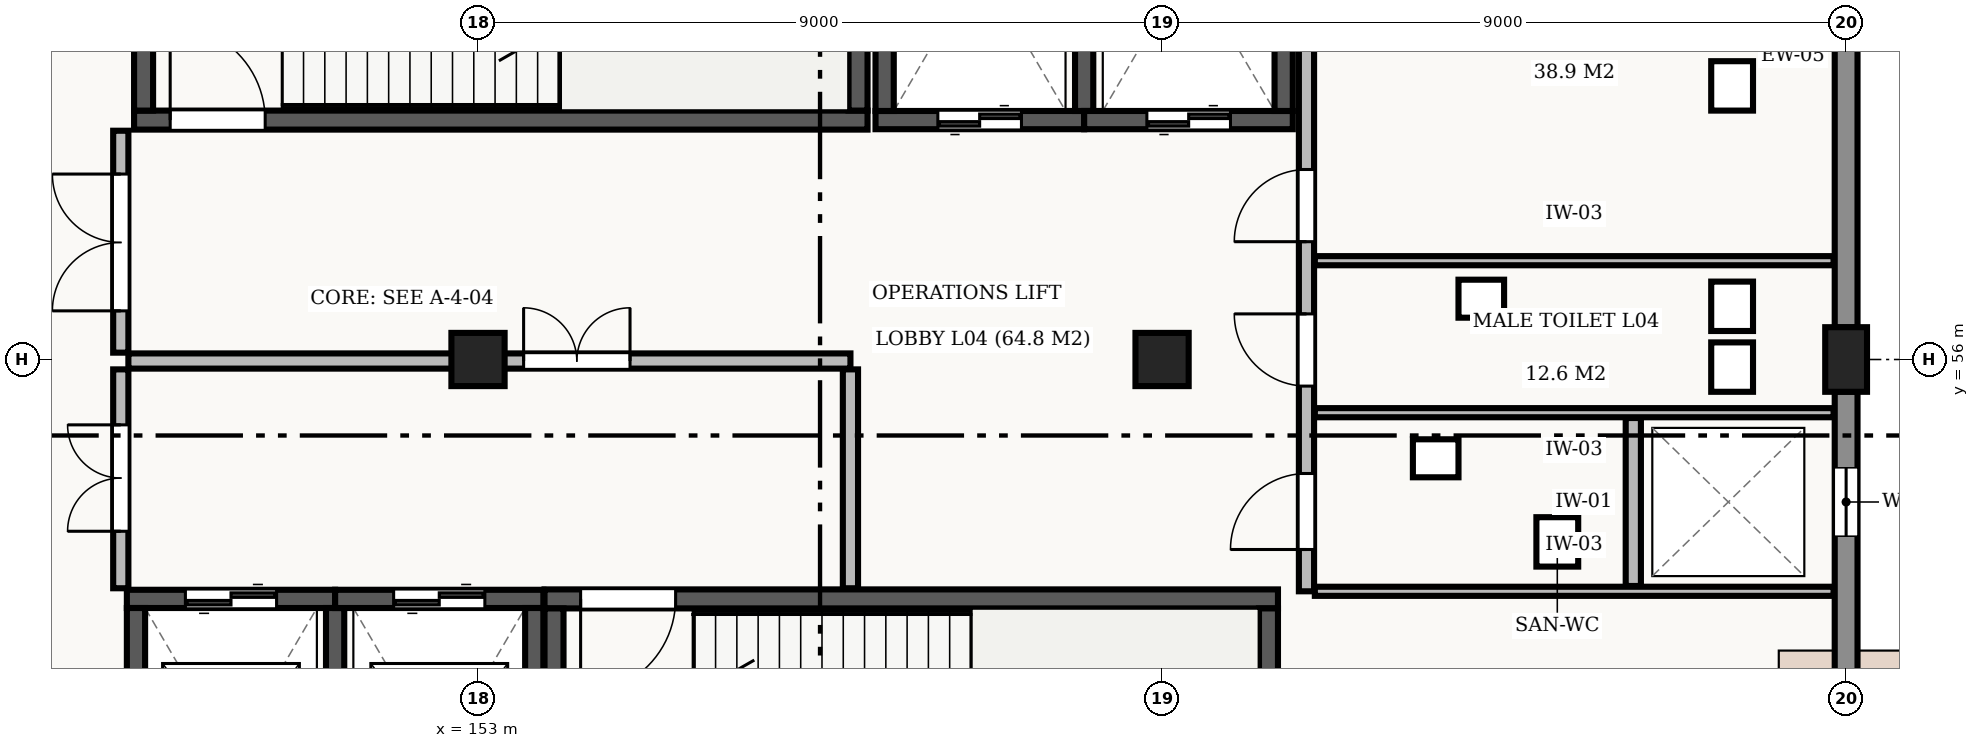
"""IFC4 building model, lengths in metres.
Left out: names, types, materials, properties, quantities, classifications, styles, units other than length and angle.
Written with IfcOpenShell. Run it as: python <this file> out.ifc"""

import sys

from ifc_helpers import new_model, si_unit, direction, frame, frame_2d, origin, origin_2d, place, context, subcontext, project, spatial, rectangle, extrude, element, fill, save


model = new_model("IFC4")
c1 = context("Model", 3, precision=1e-05, world=origin(), true_north=direction((0.0, 1.0)))
c2 = subcontext(c1, "Body", "Model", "MODEL_VIEW")
j1 = project(units=[si_unit("LENGTHUNIT", "METRE"), si_unit("PLANEANGLEUNIT", "RADIAN")], contexts=[c1])
p1 = place(None, origin())
s1 = spatial("IfcSite", under=j1, at=p1, CompositionType="ELEMENT")
p2 = place(p1, origin())
s2 = spatial("IfcBuilding", under=s1, at=p2, CompositionType="ELEMENT")
p3 = place(p2, frame((0.0, 0.0, 18.6)))
s3 = spatial("IfcBuildingStorey", under=s2, at=p3, CompositionType="ELEMENT", Elevation=18.6)
for number, where, z_axis, x_axis in (
    (1, (153.0, 56.0, 0.0), (0.0, 0.0, 1.0), (1.0, 0.0, 0.0)),
    (2, (162.0, 56.0, 0.0), (0.0, 0.0, 1.0), (1.0, 0.0, 0.0)),
):
    element("IfcColumn", number, at=place(p3, frame(where, z_axis=z_axis, x_axis=x_axis)), inside=s3, PredefinedType="COLUMN", context=c2, shape_type="SweptSolid", body=[
        extrude(rectangle(XDim=0.7, YDim=0.7, at=origin_2d()), origin(), (0.0, 0.0, 1.0), 4.2),
    ])
p4 = place(p3, frame((171.0, 56.0, 0.0), z_axis=(0.0, 0.0, 1.0), x_axis=(1.0, 0.0, 0.0)))
e3 = element("IfcColumn", 3, at=p4, inside=s3, PredefinedType="COLUMN", context=c2, shape_type="SweptSolid", body=[
    extrude(rectangle(XDim=0.55, YDim=0.85, at=origin_2d()), origin(), (0.0, 0.0, 1.0), 4.2),
])
p5 = place(p3, frame((171.0, 63.577, 0.0), z_axis=(0.0, 0.0, 1.0), x_axis=(0.0, -1.0, 0.0)))
e4 = element("IfcWall", 4, at=p5, inside=s3, PredefinedType="STANDARD", context=c2, shape_type="SweptSolid", body=[
    extrude(rectangle(XDim=7.154, YDim=0.3, at=frame_2d((3.577, 0.0))), origin(), (0.0, 0.0, 1.0), 3.44),
])
p6 = place(p5, frame((0.651, 0.0, 0.9)))
e5 = element("IfcOpeningElement", 5, at=p6, cuts=e4, PredefinedType="OPENING", context=c2, shape_type="SweptSolid", body=[
    extrude(rectangle(XDim=2.6, YDim=1.6, at=frame_2d((1.3, 0.8))), frame((0.0, 0.162, 0.0), z_axis=(0.0, -1.0, 0.0), x_axis=(1.0, 0.0, 0.0)), (0.0, 0.0, 1.0), 0.324),
])
p7 = place(p3, frame((171.0, 55.577, 0.0), z_axis=(0.0, 0.0, 1.0), x_axis=(0.0, -1.0, 0.0)))
e6 = element("IfcWall", 6, at=p7, inside=s3, PredefinedType="STANDARD", context=c2, shape_type="SweptSolid", body=[
    extrude(rectangle(XDim=7.154, YDim=0.3, at=frame_2d((3.577, 0.0))), origin(), (0.0, 0.0, 1.0), 3.39),
])
p8 = place(p7, frame((1.002, 0.0, 0.9)))
e7 = element("IfcOpeningElement", 7, at=p8, cuts=e6, PredefinedType="OPENING", context=c2, shape_type="SweptSolid", body=[
    extrude(rectangle(XDim=0.9, YDim=2.2, at=frame_2d((0.45, 1.1))), frame((0.0, 0.162, 0.0), z_axis=(0.0, -1.0, 0.0), x_axis=(1.0, 0.0, 0.0)), (0.0, 0.0, 1.0), 0.324),
])
p9 = place(p7, frame((4.469, 0.0, 0.9)))
e8 = element("IfcOpeningElement", 8, at=p9, cuts=e6, PredefinedType="OPENING", context=c2, shape_type="SweptSolid", body=[
    extrude(rectangle(XDim=0.9, YDim=2.2, at=frame_2d((0.45, 1.1))), frame((0.0, 0.162, 0.0), z_axis=(0.0, -1.0, 0.0), x_axis=(1.0, 0.0, 0.0)), (0.0, 0.0, 1.0), 0.324),
])
p10 = place(p3, frame((148.475, 59.15, 0.0), z_axis=(0.0, 0.0, 1.0), x_axis=(1.0, 0.0, 0.0)))
e9 = element("IfcWall", 9, at=p10, inside=s3, PredefinedType="SHEAR", context=c2, shape_type="SweptSolid", body=[
    extrude(rectangle(XDim=9.65, YDim=0.25, at=frame_2d((4.825, 0.0))), origin(), (0.0, 0.0, 1.0), 3.91),
])
p11 = place(p10, frame((0.475, 0.0, 0.0)))
e10 = element("IfcOpeningElement", 10, at=p11, cuts=e9, PredefinedType="OPENING", context=c2, shape_type="SweptSolid", body=[
    extrude(rectangle(XDim=1.25, YDim=2.15, at=frame_2d((0.625, 1.075))), frame((0.0, 0.137, 0.0), z_axis=(0.0, -1.0, 0.0), x_axis=(1.0, 0.0, 0.0)), (0.0, 0.0, 1.0), 0.274),
])
for number, where, z_axis, x_axis in (
    (11, (148.6, 63.125, 0.0), (0.0, 0.0, 1.0), (0.0, -1.0, 0.0)),
    (12, (158.0, 59.275, 0.0), (0.0, 0.0, 1.0), (0.0, 1.0, 0.0)),
):
    element("IfcWall", number, at=place(p3, frame(where, z_axis=z_axis, x_axis=x_axis)), inside=s3, PredefinedType="SHEAR", context=c2, shape_type="SweptSolid", body=[
        extrude(rectangle(XDim=3.85, YDim=0.25, at=frame_2d((1.925, 0.0))), origin(), (0.0, 0.0, 1.0), 3.91),
    ])
p12 = place(p3, frame((163.525, 52.85, 0.0), z_axis=(0.0, 0.0, 1.0), x_axis=(-1.0, 0.0, 0.0)))
e13 = element("IfcWall", 13, at=p12, inside=s3, PredefinedType="SHEAR", context=c2, shape_type="SweptSolid", body=[
    extrude(rectangle(XDim=9.65, YDim=0.25, at=frame_2d((4.825, 0.0))), origin(), (0.0, 0.0, 1.0), 3.91),
])
p13 = place(p12, frame((7.925, 0.0, 0.0)))
e14 = element("IfcOpeningElement", 14, at=p13, cuts=e13, PredefinedType="OPENING", context=c2, shape_type="SweptSolid", body=[
    extrude(rectangle(XDim=1.25, YDim=2.15, at=frame_2d((0.625, 1.075))), frame((0.0, 0.137, 0.0), z_axis=(0.0, -1.0, 0.0), x_axis=(1.0, 0.0, 0.0)), (0.0, 0.0, 1.0), 0.274),
])
for number, where, z_axis, x_axis in (
    (15, (154.0, 52.725, 0.0), (0.0, 0.0, 1.0), (0.0, -1.0, 0.0)),
    (16, (163.4, 48.875, 0.0), (0.0, 0.0, 1.0), (0.0, 1.0, 0.0)),
):
    element("IfcWall", number, at=place(p3, frame(where, z_axis=z_axis, x_axis=x_axis)), inside=s3, PredefinedType="SHEAR", context=c2, shape_type="SweptSolid", body=[
        extrude(rectangle(XDim=3.85, YDim=0.25, at=frame_2d((1.925, 0.0))), origin(), (0.0, 0.0, 1.0), 3.91),
    ])
p14 = place(p3, frame((158.23, 59.15, 0.0), z_axis=(0.0, 0.0, 1.0), x_axis=(1.0, 0.0, 0.0)))
e17 = element("IfcWall", 17, at=p14, inside=s3, PredefinedType="SHEAR", context=c2, shape_type="SweptSolid", body=[
    extrude(rectangle(XDim=2.745, YDim=0.24, at=frame_2d((1.373, 0.0))), origin(), (0.0, 0.0, 1.0), 3.91),
])
p15 = place(p14, frame((0.82, 0.0, 0.0)))
e18 = element("IfcOpeningElement", 18, at=p15, cuts=e17, PredefinedType="OPENING", context=c2, shape_type="SweptSolid", body=[
    extrude(rectangle(XDim=1.1, YDim=2.2, at=frame_2d((0.55, 1.1))), frame((0.0, 0.132, 0.0), z_axis=(0.0, -1.0, 0.0), x_axis=(1.0, 0.0, 0.0)), (0.0, 0.0, 1.0), 0.264),
])
for number, where, z_axis, x_axis in (
    (19, (158.35, 63.13, 0.0), (0.0, 0.0, 1.0), (0.0, -1.0, 0.0)),
    (20, (160.975, 59.27, 0.0), (0.0, 0.0, 1.0), (0.0, 1.0, 0.0)),
):
    element("IfcWall", number, at=place(p3, frame(where, z_axis=z_axis, x_axis=x_axis)), inside=s3, PredefinedType="SHEAR", context=c2, shape_type="SweptSolid", body=[
        extrude(rectangle(XDim=3.86, YDim=0.24, at=frame_2d((1.93, 0.0))), origin(), (0.0, 0.0, 1.0), 3.91),
    ])
p16 = place(p3, frame((160.975, 59.15, 0.0), z_axis=(0.0, 0.0, 1.0), x_axis=(1.0, 0.0, 0.0)))
e21 = element("IfcWall", 21, at=p16, inside=s3, PredefinedType="SHEAR", context=c2, shape_type="SweptSolid", body=[
    extrude(rectangle(XDim=2.745, YDim=0.24, at=frame_2d((1.373, 0.0))), origin(), (0.0, 0.0, 1.0), 3.91),
])
p17 = place(p16, frame((0.825, 0.0, 0.0)))
e22 = element("IfcOpeningElement", 22, at=p17, cuts=e21, PredefinedType="OPENING", context=c2, shape_type="SweptSolid", body=[
    extrude(rectangle(XDim=1.1, YDim=2.2, at=frame_2d((0.55, 1.1))), frame((0.0, 0.132, 0.0), z_axis=(0.0, -1.0, 0.0), x_axis=(1.0, 0.0, 0.0)), (0.0, 0.0, 1.0), 0.264),
])
p18 = place(p3, frame((163.6, 59.27, 0.0), z_axis=(0.0, 0.0, 1.0), x_axis=(0.0, 1.0, 0.0)))
e23 = element("IfcWall", 23, at=p18, inside=s3, PredefinedType="SHEAR", context=c2, shape_type="SweptSolid", body=[
    extrude(rectangle(XDim=3.86, YDim=0.24, at=frame_2d((1.93, 0.0))), origin(), (0.0, 0.0, 1.0), 3.91),
])
p19 = place(p3, frame((151.12, 52.85, 0.0), z_axis=(0.0, 0.0, 1.0), x_axis=(-1.0, 0.0, 0.0)))
e24 = element("IfcWall", 24, at=p19, inside=s3, PredefinedType="SHEAR", context=c2, shape_type="SweptSolid", body=[
    extrude(rectangle(XDim=2.74, YDim=0.24, at=frame_2d((1.37, 0.0))), origin(), (0.0, 0.0, 1.0), 3.91),
])
p20 = place(p19, frame((0.77, 0.0, 0.0)))
e25 = element("IfcOpeningElement", 25, at=p20, cuts=e24, PredefinedType="OPENING", context=c2, shape_type="SweptSolid", body=[
    extrude(rectangle(XDim=1.2, YDim=2.2, at=frame_2d((0.6, 1.1))), frame((0.0, 0.132, 0.0), z_axis=(0.0, -1.0, 0.0), x_axis=(1.0, 0.0, 0.0)), (0.0, 0.0, 1.0), 0.264),
])
for number, where, z_axis, x_axis in (
    (26, (148.5, 52.73, 0.0), (0.0, 0.0, 1.0), (0.0, -1.0, 0.0)),
    (27, (151.12, 48.87, 0.0), (0.0, 0.0, 1.0), (0.0, 1.0, 0.0)),
):
    element("IfcWall", number, at=place(p3, frame(where, z_axis=z_axis, x_axis=x_axis)), inside=s3, PredefinedType="SHEAR", context=c2, shape_type="SweptSolid", body=[
        extrude(rectangle(XDim=3.86, YDim=0.24, at=frame_2d((1.93, 0.0))), origin(), (0.0, 0.0, 1.0), 3.91),
    ])
p21 = place(p3, frame((153.86, 52.85, 0.0), z_axis=(0.0, 0.0, 1.0), x_axis=(-1.0, 0.0, 0.0)))
e28 = element("IfcWall", 28, at=p21, inside=s3, PredefinedType="SHEAR", context=c2, shape_type="SweptSolid", body=[
    extrude(rectangle(XDim=2.74, YDim=0.24, at=frame_2d((1.37, 0.0))), origin(), (0.0, 0.0, 1.0), 3.91),
])
p22 = place(p21, frame((0.77, 0.0, 0.0)))
e29 = element("IfcOpeningElement", 29, at=p22, cuts=e28, PredefinedType="OPENING", context=c2, shape_type="SweptSolid", body=[
    extrude(rectangle(XDim=1.2, YDim=2.2, at=frame_2d((0.6, 1.1))), frame((0.0, 0.132, 0.0), z_axis=(0.0, -1.0, 0.0), x_axis=(1.0, 0.0, 0.0)), (0.0, 0.0, 1.0), 0.264),
])
p23 = place(p3, frame((153.74, 48.87, 0.0), z_axis=(0.0, 0.0, 1.0), x_axis=(0.0, 1.0, 0.0)))
e30 = element("IfcWall", 30, at=p23, inside=s3, PredefinedType="SHEAR", context=c2, shape_type="SweptSolid", body=[
    extrude(rectangle(XDim=3.86, YDim=0.24, at=frame_2d((1.93, 0.0))), origin(), (0.0, 0.0, 1.0), 3.91),
])
p24 = place(p3, frame((148.4, 55.98, 0.0), z_axis=(0.0, 0.0, 1.0), x_axis=(1.0, 0.0, 0.0)))
e31 = element("IfcWall", 31, at=p24, inside=s3, PredefinedType="STANDARD", context=c2, shape_type="SweptSolid", body=[
    extrude(rectangle(XDim=9.5, YDim=0.2, at=frame_2d((4.75, 0.0))), origin(), (0.0, 0.0, 1.0), 3.34),
])
p25 = place(p24, frame((5.2, 0.0, 0.0)))
e32 = element("IfcOpeningElement", 32, at=p25, cuts=e31, PredefinedType="OPENING", context=c2, shape_type="SweptSolid", body=[
    extrude(rectangle(XDim=1.4, YDim=2.2, at=frame_2d((0.7, 1.1))), frame((0.0, 0.112, 0.0), z_axis=(0.0, -1.0, 0.0), x_axis=(1.0, 0.0, 0.0)), (0.0, 0.0, 1.0), 0.224),
])
p26 = place(p3, frame((157.9, 52.99, 0.0), z_axis=(0.0, 0.0, 1.0), x_axis=(0.0, 1.0, 0.0)))
e33 = element("IfcWall", 33, at=p26, inside=s3, PredefinedType="STANDARD", context=c2, shape_type="SweptSolid", body=[
    extrude(rectangle(XDim=2.88, YDim=0.2, at=frame_2d((1.44, 0.0))), origin(), (0.0, 0.0, 1.0), 3.91),
])
p27 = place(p3, frame((148.3, 52.99, 0.0), z_axis=(0.0, 0.0, 1.0), x_axis=(0.0, 1.0, 0.0)))
e34 = element("IfcWall", 34, at=p27, inside=s3, PredefinedType="STANDARD", context=c2, shape_type="SweptSolid", body=[
    extrude(rectangle(XDim=2.88, YDim=0.2, at=frame_2d((1.44, 0.0))), origin(), (0.0, 0.0, 1.0), 3.91),
])
p28 = place(p27, frame((0.75, 0.0, 0.0)))
e35 = element("IfcOpeningElement", 35, at=p28, cuts=e34, PredefinedType="OPENING", context=c2, shape_type="SweptSolid", body=[
    extrude(rectangle(XDim=1.4, YDim=2.2, at=frame_2d((0.7, 1.1))), frame((0.0, 0.112, 0.0), z_axis=(0.0, -1.0, 0.0), x_axis=(1.0, 0.0, 0.0)), (0.0, 0.0, 1.0), 0.224),
])
p29 = place(p3, frame((148.3, 56.09, 0.0), z_axis=(0.0, 0.0, 1.0), x_axis=(0.0, 1.0, 0.0)))
e36 = element("IfcWall", 36, at=p29, inside=s3, PredefinedType="STANDARD", context=c2, shape_type="SweptSolid", body=[
    extrude(rectangle(XDim=2.92, YDim=0.2, at=frame_2d((1.46, 0.0))), origin(), (0.0, 0.0, 1.0), 3.91),
])
p30 = place(p29, frame((0.55, 0.0, 0.0)))
e37 = element("IfcOpeningElement", 37, at=p30, cuts=e36, PredefinedType="OPENING", context=c2, shape_type="SweptSolid", body=[
    extrude(rectangle(XDim=1.8, YDim=2.2, at=frame_2d((0.9, 1.1))), frame((0.0, 0.112, 0.0), z_axis=(0.0, -1.0, 0.0), x_axis=(1.0, 0.0, 0.0)), (0.0, 0.0, 1.0), 0.224),
])
p31 = place(p3, frame((163.9, 52.95, 0.0), z_axis=(0.0, 0.0, 1.0), x_axis=(0.0, 1.0, 0.0)))
e38 = element("IfcWall", 38, at=p31, inside=s3, PredefinedType="STANDARD", context=c2, shape_type="SweptSolid", body=[
    extrude(rectangle(XDim=10.3, YDim=0.2, at=frame_2d((5.15, 0.0))), origin(), (0.0, 0.0, 1.0), 3.91),
])
p32 = place(p31, frame((0.55, 0.0, 0.0)))
e39 = element("IfcOpeningElement", 39, at=p32, cuts=e38, PredefinedType="OPENING", context=c2, shape_type="SweptSolid", body=[
    extrude(rectangle(XDim=1.0, YDim=2.1, at=frame_2d((0.5, 1.05))), frame((0.0, 0.112, 0.0), z_axis=(0.0, -1.0, 0.0), x_axis=(1.0, 0.0, 0.0)), (0.0, 0.0, 1.0), 0.224),
])
p33 = place(p31, frame((2.7, 0.0, 0.0)))
e40 = element("IfcOpeningElement", 40, at=p33, cuts=e38, PredefinedType="OPENING", context=c2, shape_type="SweptSolid", body=[
    extrude(rectangle(XDim=0.95, YDim=2.1, at=frame_2d((0.475, 1.05))), frame((0.0, 0.112, 0.0), z_axis=(0.0, -1.0, 0.0), x_axis=(1.0, 0.0, 0.0)), (0.0, 0.0, 1.0), 0.224),
])
p34 = place(p31, frame((4.6, 0.0, 0.0)))
e41 = element("IfcOpeningElement", 41, at=p34, cuts=e38, PredefinedType="OPENING", context=c2, shape_type="SweptSolid", body=[
    extrude(rectangle(XDim=0.95, YDim=2.1, at=frame_2d((0.475, 1.05))), frame((0.0, 0.112, 0.0), z_axis=(0.0, -1.0, 0.0), x_axis=(1.0, 0.0, 0.0)), (0.0, 0.0, 1.0), 0.224),
])
p35 = place(p3, frame((168.2, 53.02, 0.0), z_axis=(0.0, 0.0, 1.0), x_axis=(0.0, 1.0, 0.0)))
e42 = element("IfcWall", 42, at=p35, inside=s3, PredefinedType="STANDARD", context=c2, shape_type="SweptSolid", body=[
    extrude(rectangle(XDim=2.21, YDim=0.2, at=frame_2d((1.105, 0.0))), origin(), (0.0, 0.0, 1.0), 3.91),
])
for number, where, z_axis, x_axis in (
    (43, (164.01, 52.95, 0.0), (0.0, 0.0, 1.0), (1.0, 0.0, 0.0)),
    (44, (164.01, 55.3, 0.0), (0.0, 0.0, 1.0), (1.0, 0.0, 0.0)),
    (45, (164.01, 57.3, 0.0), (0.0, 0.0, 1.0), (1.0, 0.0, 0.0)),
):
    element("IfcWall", number, at=place(p3, frame(where, z_axis=z_axis, x_axis=x_axis)), inside=s3, PredefinedType="STANDARD", context=c2, shape_type="SweptSolid", body=[
        extrude(rectangle(XDim=6.825, YDim=0.12, at=frame_2d((3.413, 0.0))), origin(), (0.0, 0.0, 1.0), 3.91),
    ])
p36 = place(p8, origin())
e46 = element("IfcWindow", 46, at=p36, inside=s3, PartitioningType="SINGLE_PANEL", PredefinedType="WINDOW", context=c2, shape_type="SweptSolid", body=[
    extrude(rectangle(XDim=0.9, YDim=2.2, at=frame_2d((0.45, 1.1))), frame((0.0, 0.03, 0.0), z_axis=(0.0, -1.0, 0.0), x_axis=(1.0, 0.0, 0.0)), (0.0, 0.0, 1.0), 0.06),
])
fill(e7, e46)
p37 = place(p11, origin())
e47 = element("IfcDoor", 47, at=p37, inside=s3, OperationType="SINGLE_SWING_LEFT", PredefinedType="DOOR", context=c2, shape_type="SweptSolid", body=[
    extrude(rectangle(XDim=1.25, YDim=2.15, at=frame_2d((0.625, 1.075))), frame((0.0, 0.025, 0.0), z_axis=(0.0, -1.0, 0.0), x_axis=(1.0, 0.0, 0.0)), (0.0, 0.0, 1.0), 0.05),
])
fill(e10, e47)
p38 = place(p13, origin())
e48 = element("IfcDoor", 48, at=p38, inside=s3, OperationType="SINGLE_SWING_RIGHT", PredefinedType="DOOR", context=c2, shape_type="SweptSolid", body=[
    extrude(rectangle(XDim=1.25, YDim=2.15, at=frame_2d((0.625, 1.075))), frame((0.0, 0.025, 0.0), z_axis=(0.0, -1.0, 0.0), x_axis=(1.0, 0.0, 0.0)), (0.0, 0.0, 1.0), 0.05),
])
fill(e14, e48)
p39 = place(p15, origin())
e49 = element("IfcDoor", 49, at=p39, inside=s3, OperationType="DOUBLE_DOOR_SLIDING", PredefinedType="DOOR", context=c2, shape_type="SweptSolid", body=[
    extrude(rectangle(XDim=1.1, YDim=2.2, at=frame_2d((0.55, 1.1))), frame((0.0, 0.025, 0.0), z_axis=(0.0, -1.0, 0.0), x_axis=(1.0, 0.0, 0.0)), (0.0, 0.0, 1.0), 0.05),
])
fill(e18, e49)
p40 = place(p17, origin())
e50 = element("IfcDoor", 50, at=p40, inside=s3, OperationType="DOUBLE_DOOR_SLIDING", PredefinedType="DOOR", context=c2, shape_type="SweptSolid", body=[
    extrude(rectangle(XDim=1.1, YDim=2.2, at=frame_2d((0.55, 1.1))), frame((0.0, 0.025, 0.0), z_axis=(0.0, -1.0, 0.0), x_axis=(1.0, 0.0, 0.0)), (0.0, 0.0, 1.0), 0.05),
])
fill(e22, e50)
p41 = place(p20, origin())
e51 = element("IfcDoor", 51, at=p41, inside=s3, OperationType="DOUBLE_DOOR_SLIDING", PredefinedType="DOOR", context=c2, shape_type="SweptSolid", body=[
    extrude(rectangle(XDim=1.2, YDim=2.2, at=frame_2d((0.6, 1.1))), frame((0.0, 0.025, 0.0), z_axis=(0.0, -1.0, 0.0), x_axis=(1.0, 0.0, 0.0)), (0.0, 0.0, 1.0), 0.05),
])
fill(e25, e51)
p42 = place(p22, origin())
e52 = element("IfcDoor", 52, at=p42, inside=s3, OperationType="DOUBLE_DOOR_SLIDING", PredefinedType="DOOR", context=c2, shape_type="SweptSolid", body=[
    extrude(rectangle(XDim=1.2, YDim=2.2, at=frame_2d((0.6, 1.1))), frame((0.0, 0.025, 0.0), z_axis=(0.0, -1.0, 0.0), x_axis=(1.0, 0.0, 0.0)), (0.0, 0.0, 1.0), 0.05),
])
fill(e29, e52)
p43 = place(p25, origin())
e53 = element("IfcDoor", 53, at=p43, inside=s3, OperationType="DOUBLE_DOOR_SINGLE_SWING", PredefinedType="DOOR", context=c2, shape_type="SweptSolid", body=[
    extrude(rectangle(XDim=1.4, YDim=2.2, at=frame_2d((0.7, 1.1))), frame((0.0, 0.025, 0.0), z_axis=(0.0, -1.0, 0.0), x_axis=(1.0, 0.0, 0.0)), (0.0, 0.0, 1.0), 0.05),
])
fill(e32, e53)
p44 = place(p28, origin())
e54 = element("IfcDoor", 54, at=p44, inside=s3, OperationType="DOUBLE_DOOR_SINGLE_SWING", PredefinedType="DOOR", context=c2, shape_type="SweptSolid", body=[
    extrude(rectangle(XDim=1.4, YDim=2.2, at=frame_2d((0.7, 1.1))), frame((0.0, 0.025, 0.0), z_axis=(0.0, -1.0, 0.0), x_axis=(1.0, 0.0, 0.0)), (0.0, 0.0, 1.0), 0.05),
])
fill(e35, e54)
p45 = place(p30, origin())
e55 = element("IfcDoor", 55, at=p45, inside=s3, OperationType="DOUBLE_DOOR_SINGLE_SWING", PredefinedType="DOOR", context=c2, shape_type="SweptSolid", body=[
    extrude(rectangle(XDim=1.8, YDim=2.2, at=frame_2d((0.9, 1.1))), frame((0.0, 0.025, 0.0), z_axis=(0.0, -1.0, 0.0), x_axis=(1.0, 0.0, 0.0)), (0.0, 0.0, 1.0), 0.05),
])
fill(e37, e55)
p46 = place(p32, origin())
e56 = element("IfcDoor", 56, at=p46, inside=s3, OperationType="SINGLE_SWING_LEFT", PredefinedType="DOOR", context=c2, shape_type="SweptSolid", body=[
    extrude(rectangle(XDim=1.0, YDim=2.1, at=frame_2d((0.5, 1.05))), frame((0.0, 0.025, 0.0), z_axis=(0.0, -1.0, 0.0), x_axis=(1.0, 0.0, 0.0)), (0.0, 0.0, 1.0), 0.05),
])
fill(e39, e56)
p47 = place(p33, origin())
e57 = element("IfcDoor", 57, at=p47, inside=s3, OperationType="SINGLE_SWING_RIGHT", PredefinedType="DOOR", context=c2, shape_type="SweptSolid", body=[
    extrude(rectangle(XDim=0.95, YDim=2.1, at=frame_2d((0.475, 1.05))), frame((0.0, 0.025, 0.0), z_axis=(0.0, -1.0, 0.0), x_axis=(1.0, 0.0, 0.0)), (0.0, 0.0, 1.0), 0.05),
])
fill(e40, e57)
p48 = place(p34, origin())
e58 = element("IfcDoor", 58, at=p48, inside=s3, OperationType="SINGLE_SWING_LEFT", PredefinedType="DOOR", context=c2, shape_type="SweptSolid", body=[
    extrude(rectangle(XDim=0.95, YDim=2.1, at=frame_2d((0.475, 1.05))), frame((0.0, 0.025, 0.0), z_axis=(0.0, -1.0, 0.0), x_axis=(1.0, 0.0, 0.0)), (0.0, 0.0, 1.0), 0.05),
])
fill(e41, e58)
save(model, sys.argv[1])
